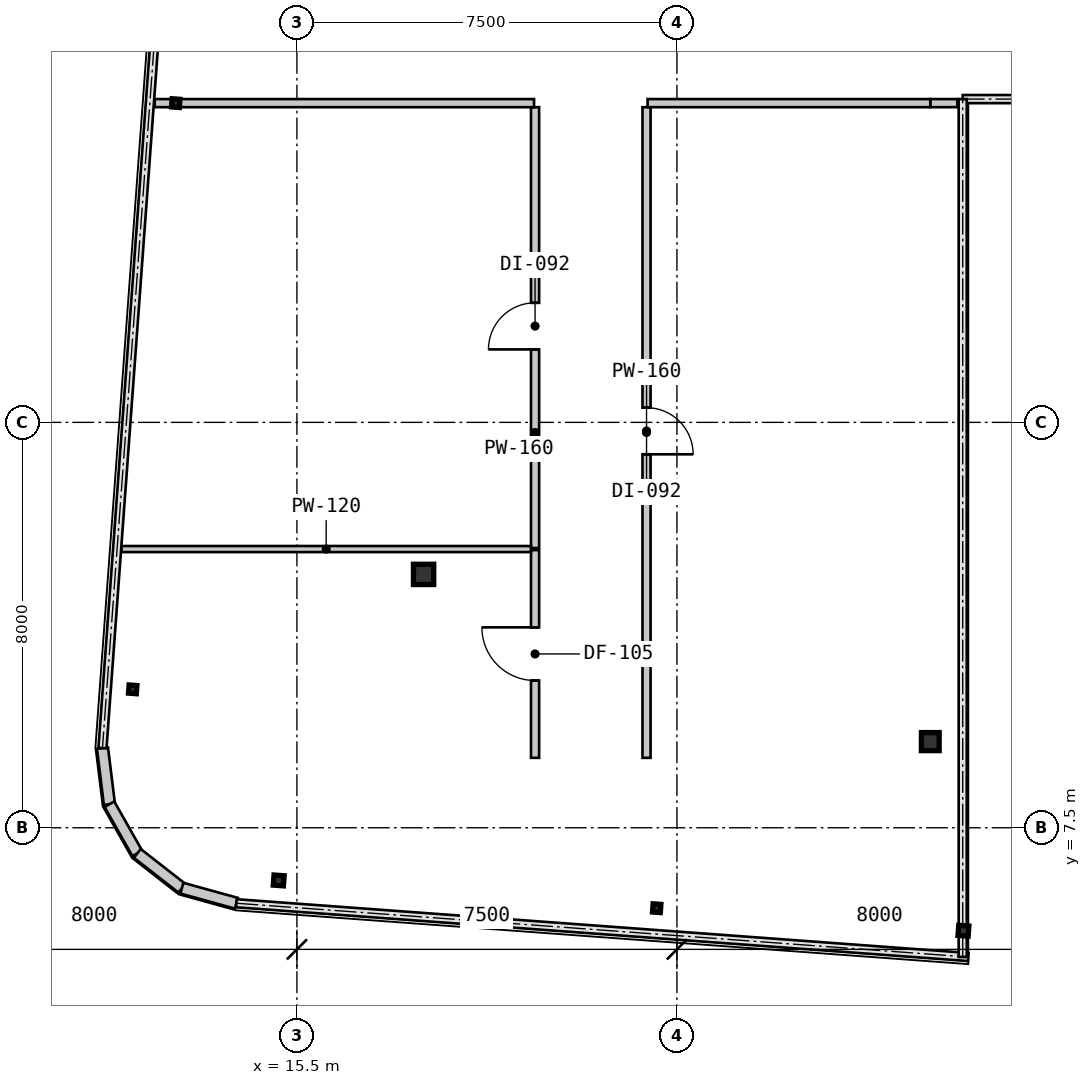
"""IFC4 building model, lengths in metres.
Left out: names, types, materials, properties, quantities, classifications, styles, units other than length and angle.
Written with IfcOpenShell. Run it as: python <this file> out.ifc"""

import sys

from ifc_helpers import new_model, si_unit, direction, frame, frame_2d, origin, origin_2d, place, context, subcontext, project, spatial, rectangle, hollow_rectangle, i_section, extrude, source, transform, mapped, element, fill, save


model = new_model("IFC4")
c1 = context("Model", 3, precision=1e-05, world=origin(), true_north=direction((0.0, 1.0)))
c2 = subcontext(c1, "Body", "Model", "MODEL_VIEW")
j1 = project(units=[si_unit("LENGTHUNIT", "METRE"), si_unit("PLANEANGLEUNIT", "RADIAN")], contexts=[c1])
p1 = place(None, origin())
s1 = spatial("IfcSite", under=j1, at=p1, CompositionType="ELEMENT")
p2 = place(p1, origin())
s2 = spatial("IfcBuilding", under=s1, at=p2, CompositionType="ELEMENT")
p3 = place(p2, frame((0.0, 0.0, 233.45)))
s3 = spatial("IfcBuildingStorey", under=s2, at=p3, CompositionType="ELEMENT", Elevation=233.45)
m1 = source(origin(), c2, "Body", "SweptSolid", [
    extrude(i_section(OverallWidth=0.35, OverallDepth=0.356, WebThickness=0.018, FlangeThickness=0.028, at=origin_2d()), origin(), (0.0, 0.0, 1.0), 3.15),
])
p4 = place(p3, frame((28.0, 9.2, 0.0), z_axis=(0.0, 0.0, 1.0), x_axis=(1.0, 0.0, 0.0)))
e1 = element("IfcColumn", 1, at=p4, inside=s3, PredefinedType="COLUMN", context=c2, shape_type="MappedRepresentation", body=[
    mapped(m1, transform((0.0, 0.0, 0.0), scale=1.0)),
])
m2 = source(origin(), c2, "Body", "SweptSolid", [
    extrude(hollow_rectangle(XDim=0.4, YDim=0.4, WallThickness=0.016, at=origin_2d()), origin(), (0.0, 0.0, 1.0), 3.15),
])
p5 = place(p3, frame((18.0, 12.5, 0.0), z_axis=(0.0, 0.0, 1.0), x_axis=(1.0, 0.0, 0.0)))
e2 = element("IfcColumn", 2, at=p5, inside=s3, PredefinedType="COLUMN", context=c2, shape_type="MappedRepresentation", body=[
    mapped(m2, transform((0.0, 0.0, 0.0), scale=1.0)),
])
m3 = source(origin(), c2, "Body", "SweptSolid", [
    extrude(hollow_rectangle(XDim=0.2, YDim=0.2, WallThickness=0.009, at=origin_2d()), origin(), (0.0, 0.0, 1.0), 3.15),
])
p6 = place(p3, frame((15.141, 6.46, 0.0), z_axis=(0.0, 0.0, 1.0), x_axis=(0.997314477224, -0.073238197128, 0.0)))
e3 = element("IfcColumn", 3, at=p6, inside=s3, PredefinedType="COLUMN", context=c2, shape_type="MappedRepresentation", body=[
    mapped(m3, transform((0.0, 0.0, 0.0), scale=1.0)),
])
m4 = source(origin(), c2, "Body", "SweptSolid", [
    extrude(i_section(OverallWidth=0.154, OverallDepth=0.162, WebThickness=0.008, FlangeThickness=0.011, at=origin_2d()), origin(), (0.0, 0.0, 1.0), 3.15),
])
for number, where, z_axis, x_axis in (
    (4, (22.601, 5.912, 0.0), (0.0, 0.0, 1.0), (0.997, -0.073, 0.0)),
    (5, (12.259, 10.231, 0.0), (0.0, 0.0, 1.0), (0.997, -0.073, 0.0)),
    (6, (13.109, 21.8, 0.0), (0.0, 0.0, 1.0), (0.997, -0.073, 0.0)),
):
    element("IfcColumn", number, at=place(p3, frame(where, z_axis=z_axis, x_axis=x_axis)), inside=s3, PredefinedType="COLUMN", context=c2, shape_type="MappedRepresentation", body=[
        mapped(m4, transform((0.0, 0.0, 0.0), scale=1.0)),
    ])
p7 = place(p3, frame((28.654, 5.468, 0.0), z_axis=(0.0, 0.0, 1.0), x_axis=(0.997314477224, -0.073238197128, 0.0)))
e7 = element("IfcColumn", 7, at=p7, inside=s3, PredefinedType="COLUMN", context=c2, shape_type="MappedRepresentation", body=[
    mapped(m3, transform((0.0, 0.0, 0.0), scale=1.0)),
])
m5 = source(origin(), c2, "Body", "SweptSolid", [
    extrude(rectangle(XDim=1.116, YDim=0.22, at=frame_2d((0.558, 0.0))), origin(), (0.0, 0.0, 1.0), 2.87),
])
for number, where, z_axis, x_axis in (
    (8, (11.663, 9.072, 0.0), (0.0, 0.0, 1.0), (0.123, -0.992, 0.0)),
    (9, (11.8, 7.965, 0.0), (0.0, 0.0, 1.0), (0.493, -0.87, 0.0)),
    (10, (12.35, 6.994, 0.0), (0.0, 0.0, 1.0), (0.789, -0.615, 0.0)),
):
    element("IfcWall", number, at=place(p3, frame(where, z_axis=z_axis, x_axis=x_axis)), inside=s3, PredefinedType="SOLIDWALL", context=c2, shape_type="MappedRepresentation", body=[
        mapped(m5, transform((0.0, 0.0, 0.0), scale=1.0)),
    ])
m6 = source(origin(), c2, "Body", "SweptSolid", [
    extrude(rectangle(XDim=1.116, YDim=0.22, at=frame_2d((0.558, 0.0))), origin(), (0.0, 0.0, 1.0), 2.87),
])
p8 = place(p3, frame((13.23, 6.307, 0.0), z_axis=(0.0, 0.0, 1.0), x_axis=(0.963890028874, -0.266300605026, 0.0)))
e11 = element("IfcWall", 11, at=p8, inside=s3, PredefinedType="SOLIDWALL", context=c2, shape_type="MappedRepresentation", body=[
    mapped(m6, transform((0.0, 0.0, 0.0), scale=1.0)),
])
m7 = source(origin(), c2, "Body", "SweptSolid", [
    extrude(rectangle(XDim=4.1, YDim=0.16, at=frame_2d((2.05, 0.0))), origin(), (0.0, 0.0, 1.0), 2.87),
])
p9 = place(p3, frame((20.2, 8.88, 0.0), z_axis=(0.0, 0.0, 1.0), x_axis=(0.0, 1.0, 0.0)))
e12 = element("IfcWall", 12, at=p9, inside=s3, PredefinedType="PARTITIONING", context=c2, shape_type="MappedRepresentation", body=[
    mapped(m7, transform((0.0, 0.0, 0.0), scale=1.0)),
])
m8 = source(origin(), c2, "Body", "SweptSolid", [
    extrude(rectangle(XDim=1.05, YDim=2.1, at=frame_2d((0.525, 1.05))), frame((0.0, 0.09, 0.0), z_axis=(0.0, -1.0, 0.0), x_axis=(1.0, 0.0, 0.0)), (0.0, 0.0, 1.0), 0.18),
])
p10 = place(p9, frame((1.525, 0.0, 0.0)))
e13 = element("IfcOpeningElement", 13, at=p10, cuts=e12, PredefinedType="OPENING", context=c2, shape_type="MappedRepresentation", body=[
    mapped(m8, transform((0.0, 0.0, 0.0), scale=1.0)),
])
m9 = source(origin(), c2, "Body", "SweptSolid", [
    extrude(rectangle(XDim=8.7, YDim=0.16, at=frame_2d((4.35, 0.0))), origin(), (0.0, 0.0, 1.0), 2.87),
])
p11 = place(p3, frame((20.2, 13.02, 0.0), z_axis=(0.0, 0.0, 1.0), x_axis=(0.0, 1.0, 0.0)))
e14 = element("IfcWall", 14, at=p11, inside=s3, PredefinedType="PARTITIONING", context=c2, shape_type="MappedRepresentation", body=[
    mapped(m9, transform((0.0, 0.0, 0.0), scale=1.0)),
])
m10 = source(origin(), c2, "Body", "SweptSolid", [
    extrude(rectangle(XDim=0.92, YDim=2.1, at=frame_2d((0.46, 1.05))), frame((0.0, 0.09, 0.0), z_axis=(0.0, -1.0, 0.0), x_axis=(1.0, 0.0, 0.0)), (0.0, 0.0, 1.0), 0.18),
])
p12 = place(p11, frame((3.92, 0.0, 0.0)))
e15 = element("IfcOpeningElement", 15, at=p12, cuts=e14, PredefinedType="OPENING", context=c2, shape_type="MappedRepresentation", body=[
    mapped(m10, transform((0.0, 0.0, 0.0), scale=1.0)),
])
m11 = source(origin(), c2, "Body", "SweptSolid", [
    extrude(rectangle(XDim=7.486, YDim=0.16, at=frame_2d((3.743, 0.0))), origin(), (0.0, 0.0, 1.0), 2.87),
])
p13 = place(p3, frame((20.18, 21.8, 0.0), z_axis=(0.0, 0.0, 1.0), x_axis=(-1.0, 0.0, 0.0)))
e16 = element("IfcWall", 16, at=p13, inside=s3, PredefinedType="PARTITIONING", context=c2, shape_type="MappedRepresentation", body=[
    mapped(m11, transform((0.0, 0.0, 0.0), scale=1.0)),
])
m12 = source(origin(), c2, "Body", "SweptSolid", [
    extrude(rectangle(XDim=12.84, YDim=0.16, at=frame_2d((6.42, 0.0))), origin(), (0.0, 0.0, 1.0), 2.87),
])
p14 = place(p3, frame((22.4, 21.72, 0.0), z_axis=(0.0, 0.0, 1.0), x_axis=(0.0, -1.0, 0.0)))
e17 = element("IfcWall", 17, at=p14, inside=s3, PredefinedType="PARTITIONING", context=c2, shape_type="MappedRepresentation", body=[
    mapped(m12, transform((0.0, 0.0, 0.0), scale=1.0)),
])
p15 = place(p14, frame((5.93, 0.0, 0.0)))
e18 = element("IfcOpeningElement", 18, at=p15, cuts=e17, PredefinedType="OPENING", context=c2, shape_type="MappedRepresentation", body=[
    mapped(m10, transform((0.0, 0.0, 0.0), scale=1.0)),
])
m13 = source(origin(), c2, "Body", "SweptSolid", [
    extrude(rectangle(XDim=0.534, YDim=0.16, at=frame_2d((0.267, 0.0))), origin(), (0.0, 0.0, 1.0), 2.17),
])
p16 = place(p3, frame((28.534, 21.8, 0.0), z_axis=(0.0, 0.0, 1.0), x_axis=(-1.0, 0.0, 0.0)))
e19 = element("IfcWall", 19, at=p16, inside=s3, PredefinedType="PARTITIONING", context=c2, shape_type="MappedRepresentation", body=[
    mapped(m13, transform((0.0, 0.0, 0.0), scale=1.0)),
])
m14 = source(origin(), c2, "Body", "SweptSolid", [
    extrude(rectangle(XDim=5.58, YDim=0.16, at=frame_2d((2.79, 0.0))), origin(), (0.0, 0.0, 1.0), 2.87),
])
p17 = place(p3, frame((28.0, 21.8, 0.0), z_axis=(0.0, 0.0, 1.0), x_axis=(-1.0, 0.0, 0.0)))
e20 = element("IfcWall", 20, at=p17, inside=s3, PredefinedType="PARTITIONING", context=c2, shape_type="MappedRepresentation", body=[
    mapped(m14, transform((0.0, 0.0, 0.0), scale=1.0)),
])
m15 = source(origin(), c2, "Body", "SweptSolid", [
    extrude(rectangle(XDim=8.081, YDim=0.12, at=frame_2d((4.04, 0.0))), origin(), (0.0, 0.0, 1.0), 2.87),
])
p18 = place(p3, frame((12.037, 13.0, 0.0), z_axis=(0.0, 0.0, 1.0), x_axis=(1.0, 0.0, 0.0)))
e21 = element("IfcWall", 21, at=p18, inside=s3, PredefinedType="PARTITIONING", context=c2, shape_type="MappedRepresentation", body=[
    mapped(m15, transform((0.0, 0.0, 0.0), scale=1.0)),
])
m16 = source(origin(), c2, "Body", "SweptSolid", [
    extrude(rectangle(XDim=1.05, YDim=2.1, at=frame_2d((0.525, 1.05))), frame((0.0, 0.025, 0.0), z_axis=(0.0, -1.0, 0.0), x_axis=(1.0, 0.0, 0.0)), (0.0, 0.0, 1.0), 0.05),
])
p19 = place(p10, origin())
e22 = element("IfcDoor", 22, at=p19, inside=s3, OperationType="SINGLE_SWING_RIGHT", PredefinedType="DOOR", context=c2, shape_type="MappedRepresentation", body=[
    mapped(m16, transform((0.0, 0.0, 0.0), scale=1.0)),
])
fill(e13, e22)
m17 = source(origin(), c2, "Body", "SweptSolid", [
    extrude(rectangle(XDim=0.92, YDim=2.1, at=frame_2d((0.46, 1.05))), frame((0.0, 0.025, 0.0), z_axis=(0.0, -1.0, 0.0), x_axis=(1.0, 0.0, 0.0)), (0.0, 0.0, 1.0), 0.05),
])
p20 = place(p12, origin())
e23 = element("IfcDoor", 23, at=p20, inside=s3, OperationType="SINGLE_SWING_LEFT", PredefinedType="DOOR", context=c2, shape_type="MappedRepresentation", body=[
    mapped(m17, transform((0.0, 0.0, 0.0), scale=1.0)),
])
fill(e15, e23)
p21 = place(p15, origin())
e24 = element("IfcDoor", 24, at=p21, inside=s3, OperationType="SINGLE_SWING_RIGHT", PredefinedType="DOOR", context=c2, shape_type="MappedRepresentation", body=[
    mapped(m17, transform((0.0, 0.0, 0.0), scale=1.0)),
])
fill(e18, e24)
save(model, sys.argv[1])
